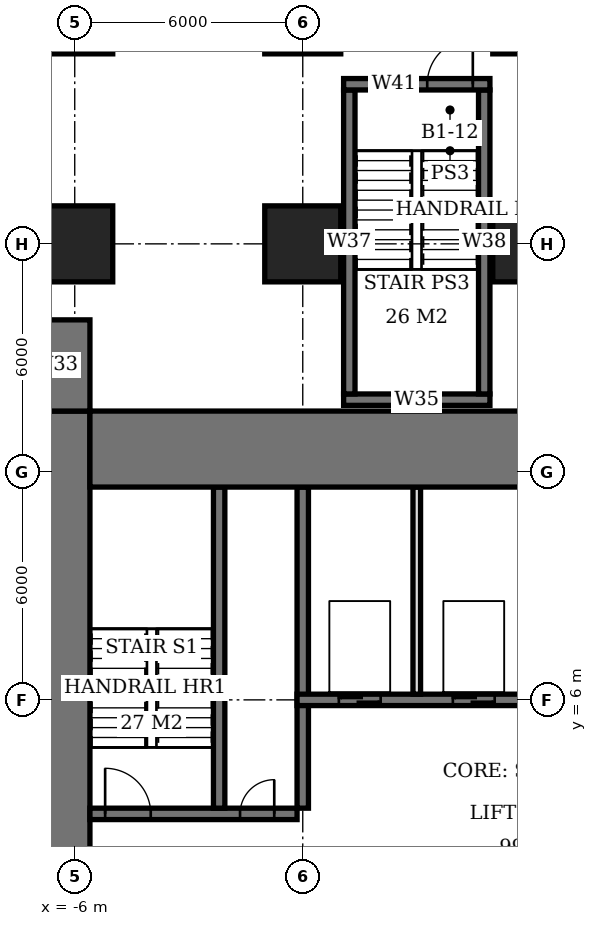
"""IFC4 building model, lengths in metres.
Left out: names, types, materials, properties, quantities, classifications, styles, units other than length and angle.
Written with IfcOpenShell. Run it as: python <this file> out.ifc"""

import sys

from ifc_helpers import new_model, si_unit, direction, frame, frame_2d, origin, origin_2d, place, context, subcontext, project, spatial, rectangle, extrude, element, fill, save


model = new_model("IFC4")
c1 = context("Model", 3, precision=1e-05, world=origin(), true_north=direction((0.0, 1.0)))
c2 = subcontext(c1, "Body", "Model", "MODEL_VIEW")
j1 = project(units=[si_unit("LENGTHUNIT", "METRE"), si_unit("PLANEANGLEUNIT", "RADIAN")], contexts=[c1])
p1 = place(None, origin())
s1 = spatial("IfcSite", under=j1, at=p1, CompositionType="ELEMENT")
p2 = place(p1, origin())
s2 = spatial("IfcBuilding", under=s1, at=p2, CompositionType="ELEMENT")
p3 = place(p2, frame((0.0, 0.0, -4.5)))
s3 = spatial("IfcBuildingStorey", under=s2, at=p3, CompositionType="ELEMENT", Elevation=-4.5)
p4 = place(p3, frame((-6.0, 18.0, 0.0), z_axis=(0.0, 0.0, 1.0), x_axis=(1.0, 0.0, 0.0)))
e1 = element("IfcColumn", 1, at=p4, inside=s3, PredefinedType="COLUMN", context=c2, shape_type="SweptSolid", body=[
    extrude(rectangle(XDim=2.0, YDim=2.0, at=origin_2d()), origin(), (0.0, 0.0, 1.0), 4.5),
])
p5 = place(p3, frame((-6.0, 24.0, 0.0), z_axis=(0.0, 0.0, 1.0), x_axis=(1.0, 0.0, 0.0)))
e2 = element("IfcColumn", 2, at=p5, inside=s3, PredefinedType="COLUMN", context=c2, shape_type="SweptSolid", body=[
    extrude(rectangle(XDim=2.0, YDim=2.0, at=origin_2d()), origin(), (0.0, 0.0, 1.0), 4.05),
])
p6 = place(p3, frame((0.0, 18.0, 0.0), z_axis=(0.0, 0.0, 1.0), x_axis=(1.0, 0.0, 0.0)))
e3 = element("IfcColumn", 3, at=p6, inside=s3, PredefinedType="COLUMN", context=c2, shape_type="SweptSolid", body=[
    extrude(rectangle(XDim=2.0, YDim=2.0, at=origin_2d()), origin(), (0.0, 0.0, 1.0), 4.5),
])
p7 = place(p3, frame((0.0, 24.0, 0.0), z_axis=(0.0, 0.0, 1.0), x_axis=(1.0, 0.0, 0.0)))
e4 = element("IfcColumn", 4, at=p7, inside=s3, PredefinedType="COLUMN", context=c2, shape_type="SweptSolid", body=[
    extrude(rectangle(XDim=2.0, YDim=2.0, at=origin_2d()), origin(), (0.0, 0.0, 1.0), 4.05),
])
p8 = place(p3, frame((6.0, 18.0, 0.0), z_axis=(0.0, 0.0, 1.0), x_axis=(1.0, 0.0, 0.0)))
e5 = element("IfcColumn", 5, at=p8, inside=s3, PredefinedType="COLUMN", context=c2, shape_type="SweptSolid", body=[
    extrude(rectangle(XDim=2.0, YDim=2.0, at=origin_2d()), origin(), (0.0, 0.0, 1.0), 4.5),
])
p9 = place(p3, frame((6.0, 24.0, 0.0), z_axis=(0.0, 0.0, 1.0), x_axis=(1.0, 0.0, 0.0)))
e6 = element("IfcColumn", 6, at=p9, inside=s3, PredefinedType="COLUMN", context=c2, shape_type="SweptSolid", body=[
    extrude(rectangle(XDim=2.0, YDim=2.0, at=origin_2d()), origin(), (0.0, 0.0, 1.0), 4.05),
])
p10 = place(p3, frame((-5.6, 12.6, 0.0), z_axis=(0.0, 0.0, 1.0), x_axis=(1.0, 0.0, 0.0)))
e7 = element("IfcWall", 7, at=p10, inside=s3, PredefinedType="SHEAR", context=c2, shape_type="SweptSolid", body=[
    extrude(rectangle(XDim=23.2, YDim=2.0, at=frame_2d((11.6, 0.0))), origin(), (0.0, 0.0, 1.0), 4.5),
])
p11 = place(p3, frame((-6.5, -7.6, 0.0), z_axis=(0.0, 0.0, 1.0), x_axis=(0.0, 1.0, 0.0)))
e8 = element("IfcWall", 8, at=p11, inside=s3, PredefinedType="SHEAR", context=c2, shape_type="SweptSolid", body=[
    extrude(rectangle(XDim=21.2, YDim=1.8, at=frame_2d((10.6, 0.0))), origin(), (0.0, 0.0, 1.0), 4.5),
])
p12 = place(p11, frame((7.8, 0.0, 0.0)))
e9 = element("IfcOpeningElement", 9, at=p12, cuts=e8, PredefinedType="OPENING", context=c2, shape_type="SweptSolid", body=[
    extrude(rectangle(XDim=1.8, YDim=2.4, at=frame_2d((0.9, 1.2))), frame((0.0, 0.91, 0.0), z_axis=(0.0, -1.0, 0.0), x_axis=(1.0, 0.0, 0.0)), (0.0, 0.0, 1.0), 1.82),
])
p13 = place(p3, frame((-6.5, 13.6, 0.0), z_axis=(0.0, 0.0, 1.0), x_axis=(0.0, 1.0, 0.0)))
e10 = element("IfcWall", 10, at=p13, inside=s3, PredefinedType="SHEAR", context=c2, shape_type="SweptSolid", body=[
    extrude(rectangle(XDim=2.4, YDim=1.8, at=frame_2d((1.2, 0.0))), origin(), (0.0, 0.0, 1.0), 4.5),
])
p14 = place(p3, frame((-5.6, 3.0, 0.0), z_axis=(0.0, 0.0, 1.0), x_axis=(1.0, 0.0, 0.0)))
e11 = element("IfcWall", 11, at=p14, inside=s3, PredefinedType="SHEAR", context=c2, shape_type="SweptSolid", body=[
    extrude(rectangle(XDim=5.45, YDim=0.3, at=frame_2d((2.725, 0.0))), origin(), (0.0, 0.0, 1.0), 4.5),
])
p15 = place(p14, frame((0.4, 0.0, 0.0)))
e12 = element("IfcOpeningElement", 12, at=p15, cuts=e11, PredefinedType="OPENING", context=c2, shape_type="SweptSolid", body=[
    extrude(rectangle(XDim=1.2, YDim=2.1, at=frame_2d((0.6, 1.05))), frame((0.0, 0.16, 0.0), z_axis=(0.0, -1.0, 0.0), x_axis=(1.0, 0.0, 0.0)), (0.0, 0.0, 1.0), 0.32),
])
p16 = place(p14, frame((3.95, 0.0, 0.0)))
e13 = element("IfcOpeningElement", 13, at=p16, cuts=e11, PredefinedType="OPENING", context=c2, shape_type="SweptSolid", body=[
    extrude(rectangle(XDim=0.9, YDim=2.1, at=frame_2d((0.45, 1.05))), frame((0.0, 0.16, 0.0), z_axis=(0.0, -1.0, 0.0), x_axis=(1.0, 0.0, 0.0)), (0.0, 0.0, 1.0), 0.32),
])
p17 = place(p3, frame((-0.15, 6.0, 0.0), z_axis=(0.0, 0.0, 1.0), x_axis=(1.0, 0.0, 0.0)))
e14 = element("IfcWall", 14, at=p17, inside=s3, PredefinedType="SHEAR", context=c2, shape_type="SweptSolid", body=[
    extrude(rectangle(XDim=17.75, YDim=0.3, at=frame_2d((8.875, 0.0))), origin(), (0.0, 0.0, 1.0), 4.5),
])
p18 = place(p17, frame((13.15, 0.0, 0.0)))
e15 = element("IfcOpeningElement", 15, at=p18, cuts=e14, PredefinedType="OPENING", context=c2, shape_type="SweptSolid", body=[
    extrude(rectangle(XDim=0.9, YDim=2.1, at=frame_2d((0.45, 1.05))), frame((0.0, 0.16, 0.0), z_axis=(0.0, -1.0, 0.0), x_axis=(1.0, 0.0, 0.0)), (0.0, 0.0, 1.0), 0.32),
])
p19 = place(p17, frame((16.25, 0.0, 0.0)))
e16 = element("IfcOpeningElement", 16, at=p19, cuts=e14, PredefinedType="OPENING", context=c2, shape_type="SweptSolid", body=[
    extrude(rectangle(XDim=1.0, YDim=2.1, at=frame_2d((0.5, 1.05))), frame((0.0, 0.16, 0.0), z_axis=(0.0, -1.0, 0.0), x_axis=(1.0, 0.0, 0.0)), (0.0, 0.0, 1.0), 0.32),
])
p20 = place(p17, frame((1.1, 0.0, 0.0)))
e17 = element("IfcOpeningElement", 17, at=p20, cuts=e14, PredefinedType="OPENING", context=c2, shape_type="SweptSolid", body=[
    extrude(rectangle(XDim=1.1, YDim=2.1, at=frame_2d((0.55, 1.05))), frame((0.0, 0.16, 0.0), z_axis=(0.0, -1.0, 0.0), x_axis=(1.0, 0.0, 0.0)), (0.0, 0.0, 1.0), 0.32),
])
p21 = place(p17, frame((4.1, 0.0, 0.0)))
e18 = element("IfcOpeningElement", 18, at=p21, cuts=e14, PredefinedType="OPENING", context=c2, shape_type="SweptSolid", body=[
    extrude(rectangle(XDim=1.1, YDim=2.1, at=frame_2d((0.55, 1.05))), frame((0.0, 0.16, 0.0), z_axis=(0.0, -1.0, 0.0), x_axis=(1.0, 0.0, 0.0)), (0.0, 0.0, 1.0), 0.32),
])
p22 = place(p17, frame((7.1, 0.0, 0.0)))
e19 = element("IfcOpeningElement", 19, at=p22, cuts=e14, PredefinedType="OPENING", context=c2, shape_type="SweptSolid", body=[
    extrude(rectangle(XDim=1.1, YDim=2.1, at=frame_2d((0.55, 1.05))), frame((0.0, 0.16, 0.0), z_axis=(0.0, -1.0, 0.0), x_axis=(1.0, 0.0, 0.0)), (0.0, 0.0, 1.0), 0.32),
])
p23 = place(p17, frame((10.1, 0.0, 0.0)))
e20 = element("IfcOpeningElement", 20, at=p23, cuts=e14, PredefinedType="OPENING", context=c2, shape_type="SweptSolid", body=[
    extrude(rectangle(XDim=1.1, YDim=2.1, at=frame_2d((0.55, 1.05))), frame((0.0, 0.16, 0.0), z_axis=(0.0, -1.0, 0.0), x_axis=(1.0, 0.0, 0.0)), (0.0, 0.0, 1.0), 0.32),
])
for number, where, z_axis, x_axis in (
    (21, (0.0, 3.15, 0.0), (0.0, 0.0, 1.0), (0.0, 1.0, 0.0)),
    (22, (-2.2, 3.15, 0.0), (0.0, 0.0, 1.0), (0.0, 1.0, 0.0)),
):
    element("IfcWall", number, at=place(p3, frame(where, z_axis=z_axis, x_axis=x_axis)), inside=s3, PredefinedType="SHEAR", context=c2, shape_type="SweptSolid", body=[
        extrude(rectangle(XDim=8.45, YDim=0.3, at=frame_2d((4.225, 0.0))), origin(), (0.0, 0.0, 1.0), 4.5),
    ])
p24 = place(p3, frame((3.0, 6.15, 0.0), z_axis=(0.0, 0.0, 1.0), x_axis=(0.0, 1.0, 0.0)))
e23 = element("IfcWall", 23, at=p24, inside=s3, PredefinedType="SOLIDWALL", context=c2, shape_type="SweptSolid", body=[
    extrude(rectangle(XDim=5.45, YDim=0.2, at=frame_2d((2.725, 0.0))), origin(), (0.0, 0.0, 1.0), 4.5),
])
p25 = place(p3, frame((1.075, 13.9, 0.0), z_axis=(0.0, 0.0, 1.0), x_axis=(1.0, 0.0, 0.0)))
e24 = element("IfcWall", 24, at=p25, inside=s3, PredefinedType="SOLIDWALL", context=c2, shape_type="SweptSolid", body=[
    extrude(rectangle(XDim=3.85, YDim=0.3, at=frame_2d((1.925, 0.0))), origin(), (0.0, 0.0, 1.0), 4.05),
])
p26 = place(p3, frame((1.075, 22.2, 0.0), z_axis=(0.0, 0.0, 1.0), x_axis=(1.0, 0.0, 0.0)))
e25 = element("IfcWall", 25, at=p26, inside=s3, PredefinedType="SOLIDWALL", context=c2, shape_type="SweptSolid", body=[
    extrude(rectangle(XDim=3.85, YDim=0.3, at=frame_2d((1.925, 0.0))), origin(), (0.0, 0.0, 1.0), 4.05),
])
p27 = place(p26, frame((2.2, 0.0, 0.0)))
e26 = element("IfcOpeningElement", 26, at=p27, cuts=e25, PredefinedType="OPENING", context=c2, shape_type="SweptSolid", body=[
    extrude(rectangle(XDim=1.2, YDim=2.1, at=frame_2d((0.6, 1.05))), frame((0.0, 0.16, 0.0), z_axis=(0.0, -1.0, 0.0), x_axis=(1.0, 0.0, 0.0)), (0.0, 0.0, 1.0), 0.32),
])
for number, where, z_axis, x_axis in (
    (27, (1.225, 14.05, 0.0), (0.0, 0.0, 1.0), (0.0, 1.0, 0.0)),
    (28, (4.775, 14.05, 0.0), (0.0, 0.0, 1.0), (0.0, 1.0, 0.0)),
):
    element("IfcWall", number, at=place(p3, frame(where, z_axis=z_axis, x_axis=x_axis)), inside=s3, PredefinedType="SOLIDWALL", context=c2, shape_type="SweptSolid", body=[
        extrude(rectangle(XDim=8.0, YDim=0.3, at=frame_2d((4.0, 0.0))), origin(), (0.0, 0.0, 1.0), 4.05),
    ])
p28 = place(p15, origin())
e29 = element("IfcDoor", 29, at=p28, inside=s3, OperationType="SINGLE_SWING_LEFT", PredefinedType="DOOR", context=c2, shape_type="SweptSolid", body=[
    extrude(rectangle(XDim=1.2, YDim=2.1, at=frame_2d((0.6, 1.05))), frame((0.0, 0.025, 0.0), z_axis=(0.0, -1.0, 0.0), x_axis=(1.0, 0.0, 0.0)), (0.0, 0.0, 1.0), 0.05),
])
fill(e12, e29)
p29 = place(p16, origin())
e30 = element("IfcDoor", 30, at=p29, inside=s3, OperationType="SINGLE_SWING_RIGHT", PredefinedType="DOOR", context=c2, shape_type="SweptSolid", body=[
    extrude(rectangle(XDim=0.9, YDim=2.1, at=frame_2d((0.45, 1.05))), frame((0.0, 0.025, 0.0), z_axis=(0.0, -1.0, 0.0), x_axis=(1.0, 0.0, 0.0)), (0.0, 0.0, 1.0), 0.05),
])
fill(e13, e30)
p30 = place(p20, origin())
e31 = element("IfcDoor", 31, at=p30, inside=s3, OperationType="DOUBLE_DOOR_SLIDING", PredefinedType="USERDEFINED", context=c2, shape_type="SweptSolid", body=[
    extrude(rectangle(XDim=1.1, YDim=2.1, at=frame_2d((0.55, 1.05))), frame((0.0, 0.025, 0.0), z_axis=(0.0, -1.0, 0.0), x_axis=(1.0, 0.0, 0.0)), (0.0, 0.0, 1.0), 0.05),
])
fill(e17, e31)
p31 = place(p21, origin())
e32 = element("IfcDoor", 32, at=p31, inside=s3, OperationType="DOUBLE_DOOR_SLIDING", PredefinedType="USERDEFINED", context=c2, shape_type="SweptSolid", body=[
    extrude(rectangle(XDim=1.1, YDim=2.1, at=frame_2d((0.55, 1.05))), frame((0.0, 0.025, 0.0), z_axis=(0.0, -1.0, 0.0), x_axis=(1.0, 0.0, 0.0)), (0.0, 0.0, 1.0), 0.05),
])
fill(e18, e32)
p32 = place(p27, origin())
e33 = element("IfcDoor", 33, at=p32, inside=s3, OperationType="SINGLE_SWING_RIGHT", PredefinedType="DOOR", context=c2, shape_type="SweptSolid", body=[
    extrude(rectangle(XDim=1.2, YDim=2.1, at=frame_2d((0.6, 1.05))), frame((0.0, 0.025, 0.0), z_axis=(0.0, -1.0, 0.0), x_axis=(1.0, 0.0, 0.0)), (0.0, 0.0, 1.0), 0.05),
])
fill(e26, e33)
save(model, sys.argv[1])
